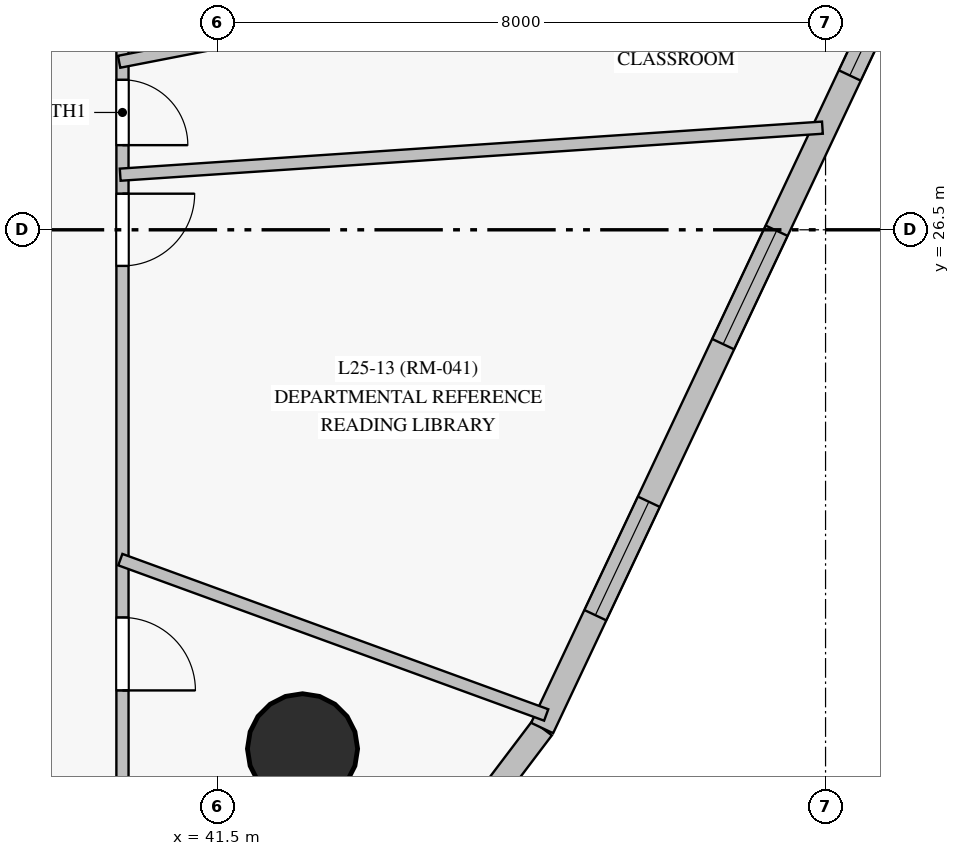
"""IFC4 building model, lengths in metres.
Left out: names, types, materials, properties, quantities, classifications, styles, units other than length and angle.
Written with IfcOpenShell. Run it as: python <this file> out.ifc"""

import sys

from ifc_helpers import new_model, si_unit, direction, frame, frame_2d, origin, origin_with_axes, origin_2d, place, context, subcontext, project, spatial, rectangle, circle, extrude, source, transform, mapped, element, fill, save


model = new_model("IFC4")
c1 = context("Model", 3, precision=1e-05, world=origin(), true_north=direction((0.0, 1.0)))
c2 = subcontext(c1, "Body", "Model", "MODEL_VIEW")
j1 = project(units=[si_unit("LENGTHUNIT", "METRE"), si_unit("PLANEANGLEUNIT", "RADIAN")], contexts=[c1])
p1 = place(None, origin())
s1 = spatial("IfcSite", under=j1, at=p1, CompositionType="ELEMENT")
p2 = place(p1, origin())
s2 = spatial("IfcBuilding", under=s1, at=p2, CompositionType="ELEMENT")
p3 = place(p2, frame((0.0, 0.0, 96.2)))
s3 = spatial("IfcBuildingStorey", under=s2, at=p3, CompositionType="ELEMENT", Elevation=96.2)
m1 = source(origin_with_axes(), c2, "Body", "SweptSolid", [
    extrude(circle(Radius=0.725, at=origin_2d()), origin(), (0.0, 0.0, 1.0), 3.05),
])
p4 = place(p3, frame((42.619, 19.672, 0.0), z_axis=(0.0, 0.0, 1.0), x_axis=(1.0, 0.0, 0.0)))
e1 = element("IfcColumn", 1, at=p4, inside=s3, PredefinedType="COLUMN", context=c2, shape_type="MappedRepresentation", body=[
    mapped(m1, transform((0.0, 0.0, 0.0), scale=1.0)),
])
p5 = place(p3, frame((39.5, 11.658, 0.0), z_axis=(0.0, 0.0, 1.0), x_axis=(0.603493536032, 0.797367889978, 0.0)))
e2 = element("IfcWall", 2, at=p5, inside=s3, PredefinedType="SOLIDWALL", context=c2, shape_type="SweptSolid", body=[
    extrude(rectangle(XDim=10.393, YDim=0.32, at=frame_2d((5.196, 0.0))), origin(), (0.0, 0.0, 1.0), 2.825),
])
p6 = place(p5, frame((1.963, 0.0, 0.85)))
e3 = element("IfcOpeningElement", 3, at=p6, cuts=e2, PredefinedType="OPENING", context=c2, shape_type="SweptSolid", body=[
    extrude(rectangle(XDim=1.65, YDim=1.65, at=frame_2d((0.825, 0.825))), frame((0.0, 0.17, 0.0), z_axis=(0.0, -1.0, 0.0), x_axis=(1.0, 0.0, 0.0)), (0.0, 0.0, 1.0), 0.34),
])
p7 = place(p5, frame((6.78, 0.0, 0.85)))
e4 = element("IfcOpeningElement", 4, at=p7, cuts=e2, PredefinedType="OPENING", context=c2, shape_type="SweptSolid", body=[
    extrude(rectangle(XDim=1.65, YDim=1.65, at=frame_2d((0.825, 0.825))), frame((0.0, 0.17, 0.0), z_axis=(0.0, -1.0, 0.0), x_axis=(1.0, 0.0, 0.0)), (0.0, 0.0, 1.0), 0.34),
])
p8 = place(p3, frame((45.771, 19.945, 0.0), z_axis=(0.0, 0.0, 1.0), x_axis=(0.426458361985, 0.904507194827, 0.0)))
e5 = element("IfcWall", 5, at=p8, inside=s3, PredefinedType="SOLIDWALL", context=c2, shape_type="SweptSolid", body=[
    extrude(rectangle(XDim=14.949, YDim=0.32, at=frame_2d((7.475, 0.0))), origin(), (0.0, 0.0, 1.0), 2.825),
])
p9 = place(p8, frame((1.641, 0.0, 0.85)))
e6 = element("IfcOpeningElement", 6, at=p9, cuts=e5, PredefinedType="OPENING", context=c2, shape_type="SweptSolid", body=[
    extrude(rectangle(XDim=1.65, YDim=1.65, at=frame_2d((0.825, 0.825))), frame((0.0, 0.17, 0.0), z_axis=(0.0, -1.0, 0.0), x_axis=(1.0, 0.0, 0.0)), (0.0, 0.0, 1.0), 0.34),
])
p10 = place(p8, frame((5.584, 0.0, 0.85)))
e7 = element("IfcOpeningElement", 7, at=p10, cuts=e5, PredefinedType="OPENING", context=c2, shape_type="SweptSolid", body=[
    extrude(rectangle(XDim=1.65, YDim=1.65, at=frame_2d((0.825, 0.825))), frame((0.0, 0.17, 0.0), z_axis=(0.0, -1.0, 0.0), x_axis=(1.0, 0.0, 0.0)), (0.0, 0.0, 1.0), 0.34),
])
p11 = place(p8, frame((9.491, 0.0, 0.85)))
e8 = element("IfcOpeningElement", 8, at=p11, cuts=e5, PredefinedType="OPENING", context=c2, shape_type="SweptSolid", body=[
    extrude(rectangle(XDim=1.65, YDim=1.65, at=frame_2d((0.825, 0.825))), frame((0.0, 0.17, 0.0), z_axis=(0.0, -1.0, 0.0), x_axis=(1.0, 0.0, 0.0)), (0.0, 0.0, 1.0), 0.34),
])
p12 = place(p8, frame((12.586, 0.0, 0.85)))
e9 = element("IfcOpeningElement", 9, at=p12, cuts=e5, PredefinedType="OPENING", context=c2, shape_type="SweptSolid", body=[
    extrude(rectangle(XDim=1.65, YDim=1.65, at=frame_2d((0.825, 0.825))), frame((0.0, 0.17, 0.0), z_axis=(0.0, -1.0, 0.0), x_axis=(1.0, 0.0, 0.0)), (0.0, 0.0, 1.0), 0.34),
])
p13 = place(p3, frame((40.25, 37.65, 0.0), z_axis=(0.0, 0.0, 1.0), x_axis=(0.0, -1.0, 0.0)))
e10 = element("IfcWall", 10, at=p13, inside=s3, PredefinedType="PARTITIONING", context=c2, shape_type="SweptSolid", body=[
    extrude(rectangle(XDim=22.3, YDim=0.16, at=frame_2d((11.15, 0.0))), origin(), (0.0, 0.0, 1.0), 2.225),
])
p14 = place(p13, frame((16.25, 0.0, 0.0)))
e11 = element("IfcOpeningElement", 11, at=p14, cuts=e10, PredefinedType="OPENING", context=c2, shape_type="SweptSolid", body=[
    extrude(rectangle(XDim=0.96, YDim=2.15, at=frame_2d((0.48, 1.075))), frame((0.0, 0.09, 0.0), z_axis=(0.0, -1.0, 0.0), x_axis=(1.0, 0.0, 0.0)), (0.0, 0.0, 1.0), 0.18),
])
p15 = place(p13, frame((10.675, 0.0, 0.0)))
e12 = element("IfcOpeningElement", 12, at=p15, cuts=e10, PredefinedType="OPENING", context=c2, shape_type="SweptSolid", body=[
    extrude(rectangle(XDim=0.95, YDim=2.15, at=frame_2d((0.475, 1.075))), frame((0.0, 0.09, 0.0), z_axis=(0.0, -1.0, 0.0), x_axis=(1.0, 0.0, 0.0)), (0.0, 0.0, 1.0), 0.18),
])
p16 = place(p13, frame((9.177, 0.0, 0.0)))
e13 = element("IfcOpeningElement", 13, at=p16, cuts=e10, PredefinedType="OPENING", context=c2, shape_type="SweptSolid", body=[
    extrude(rectangle(XDim=0.86, YDim=2.1, at=frame_2d((0.43, 1.05))), frame((0.0, 0.09, 0.0), z_axis=(0.0, -1.0, 0.0), x_axis=(1.0, 0.0, 0.0)), (0.0, 0.0, 1.0), 0.18),
])
p17 = place(p13, frame((7.33, 0.0, 0.0)))
e14 = element("IfcOpeningElement", 14, at=p17, cuts=e10, PredefinedType="OPENING", context=c2, shape_type="SweptSolid", body=[
    extrude(rectangle(XDim=0.96, YDim=2.15, at=frame_2d((0.48, 1.075))), frame((0.0, 0.09, 0.0), z_axis=(0.0, -1.0, 0.0), x_axis=(1.0, 0.0, 0.0)), (0.0, 0.0, 1.0), 0.18),
])
p18 = place(p13, frame((5.24, 0.0, 0.0)))
e15 = element("IfcOpeningElement", 15, at=p18, cuts=e10, PredefinedType="OPENING", context=c2, shape_type="SweptSolid", body=[
    extrude(rectangle(XDim=0.95, YDim=2.15, at=frame_2d((0.475, 1.075))), frame((0.0, 0.09, 0.0), z_axis=(0.0, -1.0, 0.0), x_axis=(1.0, 0.0, 0.0)), (0.0, 0.0, 1.0), 0.18),
])
p19 = place(p13, frame((2.38, 0.0, 0.0)))
e16 = element("IfcOpeningElement", 16, at=p19, cuts=e10, PredefinedType="OPENING", context=c2, shape_type="SweptSolid", body=[
    extrude(rectangle(XDim=0.96, YDim=2.15, at=frame_2d((0.48, 1.075))), frame((0.0, 0.09, 0.0), z_axis=(0.0, -1.0, 0.0), x_axis=(1.0, 0.0, 0.0)), (0.0, 0.0, 1.0), 0.18),
])
p20 = place(p3, frame((40.206, 28.71, 0.0), z_axis=(0.0, 0.0, 1.0), x_axis=(0.981681749556, 0.190528062468, 0.0)))
e17 = element("IfcWall", 17, at=p20, inside=s3, PredefinedType="PARTITIONING", context=c2, shape_type="SweptSolid", body=[
    extrude(rectangle(XDim=10.828, YDim=0.16, at=frame_2d((5.414, 0.0))), origin(), (0.0, 0.0, 1.0), 2.825),
])
p21 = place(p3, frame((40.22, 27.225, 0.0), z_axis=(0.0, 0.0, 1.0), x_axis=(0.997763638744, 0.066841014355, 0.0)))
e18 = element("IfcWall", 18, at=p21, inside=s3, PredefinedType="PARTITIONING", context=c2, shape_type="SweptSolid", body=[
    extrude(rectangle(XDim=9.259, YDim=0.16, at=frame_2d((4.63, 0.0))), origin(), (0.0, 0.0, 1.0), 2.825),
])
p22 = place(p3, frame((40.222, 22.161, 0.0), z_axis=(0.0, 0.0, 1.0), x_axis=(0.939457123794, -0.342666474217, 0.0)))
e19 = element("IfcWall", 19, at=p22, inside=s3, PredefinedType="PARTITIONING", context=c2, shape_type="SweptSolid", body=[
    extrude(rectangle(XDim=5.964, YDim=0.16, at=frame_2d((2.982, 0.0))), origin(), (0.0, 0.0, 1.0), 2.825),
])
m2 = source(origin_with_axes(), c2, "Body", "SweptSolid", [
    extrude(rectangle(XDim=1.65, YDim=1.65, at=frame_2d((0.825, 0.825))), frame((0.0, 0.03, 0.0), z_axis=(0.0, -1.0, 0.0), x_axis=(1.0, 0.0, 0.0)), (0.0, 0.0, 1.0), 0.06),
])
p23 = place(p9, origin())
e20 = element("IfcWindow", 20, at=p23, inside=s3, PartitioningType="SINGLE_PANEL", PredefinedType="WINDOW", context=c2, shape_type="MappedRepresentation", body=[
    mapped(m2, transform((0.0, 0.0, 0.0), scale=1.0)),
])
fill(e6, e20)
p24 = place(p10, origin())
e21 = element("IfcWindow", 21, at=p24, inside=s3, PartitioningType="SINGLE_PANEL", PredefinedType="WINDOW", context=c2, shape_type="MappedRepresentation", body=[
    mapped(m2, transform((0.0, 0.0, 0.0), scale=1.0)),
])
fill(e7, e21)
p25 = place(p11, origin())
e22 = element("IfcWindow", 22, at=p25, inside=s3, PartitioningType="SINGLE_PANEL", PredefinedType="WINDOW", context=c2, shape_type="MappedRepresentation", body=[
    mapped(m2, transform((0.0, 0.0, 0.0), scale=1.0)),
])
fill(e8, e22)
m3 = source(origin_with_axes(), c2, "Body", "SweptSolid", [
    extrude(rectangle(XDim=0.96, YDim=2.15, at=frame_2d((0.48, 1.075))), frame((0.0, 0.025, 0.0), z_axis=(0.0, -1.0, 0.0), x_axis=(1.0, 0.0, 0.0)), (0.0, 0.0, 1.0), 0.05),
])
p26 = place(p14, origin())
e23 = element("IfcDoor", 23, at=p26, inside=s3, OperationType="SINGLE_SWING_RIGHT", PredefinedType="DOOR", context=c2, shape_type="MappedRepresentation", body=[
    mapped(m3, transform((0.0, 0.0, 0.0), scale=1.0)),
])
fill(e11, e23)
m4 = source(origin_with_axes(), c2, "Body", "SweptSolid", [
    extrude(rectangle(XDim=0.95, YDim=2.15, at=frame_2d((0.475, 1.075))), frame((0.0, 0.025, 0.0), z_axis=(0.0, -1.0, 0.0), x_axis=(1.0, 0.0, 0.0)), (0.0, 0.0, 1.0), 0.05),
])
p27 = place(p15, origin())
e24 = element("IfcDoor", 24, at=p27, inside=s3, OperationType="SINGLE_SWING_LEFT", PredefinedType="DOOR", context=c2, shape_type="MappedRepresentation", body=[
    mapped(m4, transform((0.0, 0.0, 0.0), scale=1.0)),
])
fill(e12, e24)
m5 = source(origin_with_axes(), c2, "Body", "SweptSolid", [
    extrude(rectangle(XDim=0.86, YDim=2.1, at=frame_2d((0.43, 1.05))), frame((0.0, 0.025, 0.0), z_axis=(0.0, -1.0, 0.0), x_axis=(1.0, 0.0, 0.0)), (0.0, 0.0, 1.0), 0.05),
])
p28 = place(p16, origin())
e25 = element("IfcDoor", 25, at=p28, inside=s3, OperationType="SINGLE_SWING_RIGHT", PredefinedType="DOOR", context=c2, shape_type="MappedRepresentation", body=[
    mapped(m5, transform((0.0, 0.0, 0.0), scale=1.0)),
])
fill(e13, e25)
save(model, sys.argv[1])
